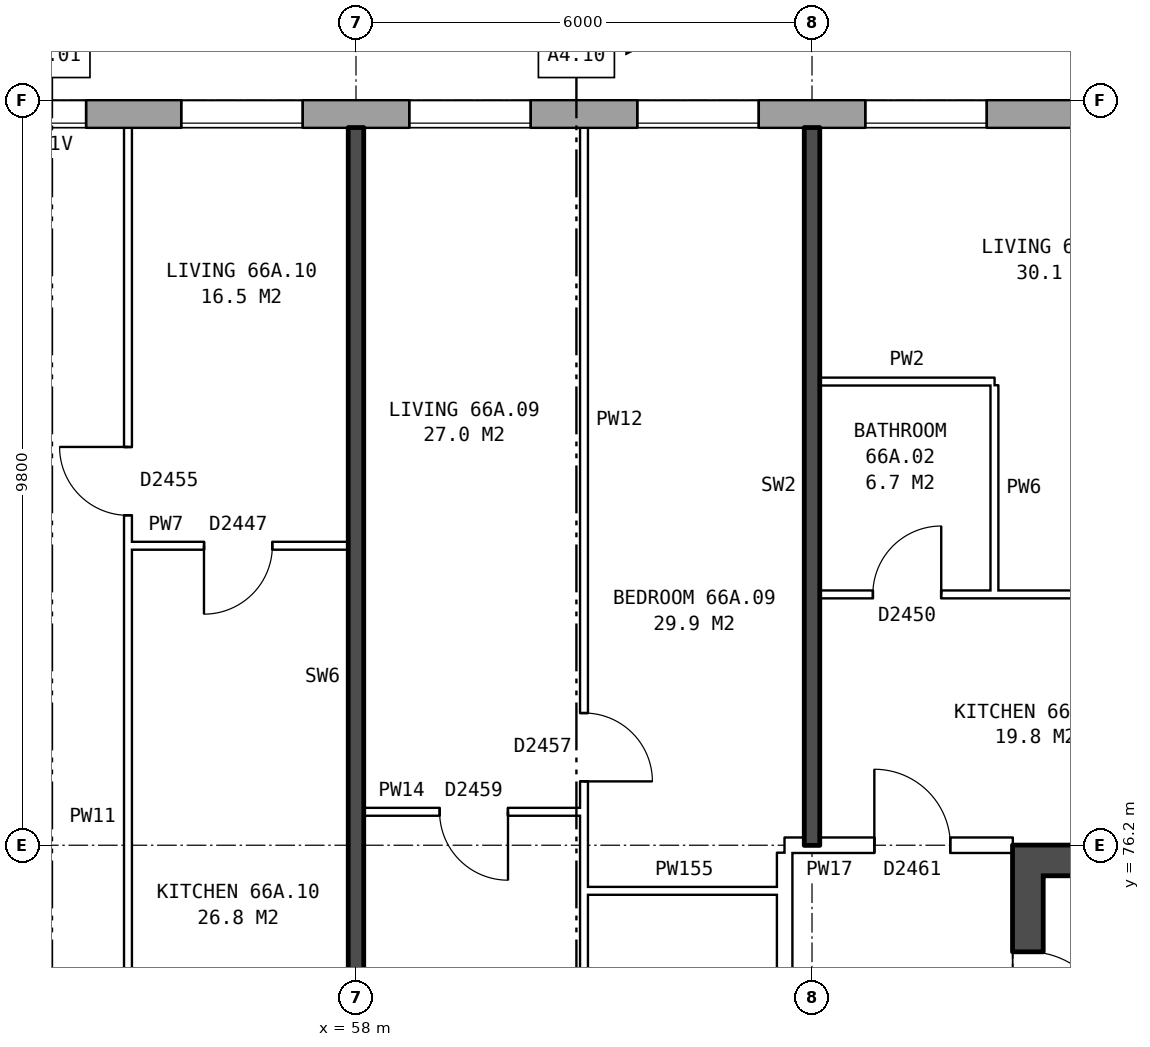
"""IFC4 building model, lengths in metres.
Left out: names, types, materials, properties, quantities, classifications, styles, units other than length and angle.
Written with IfcOpenShell. Run it as: python <this file> out.ifc"""

import sys

from ifc_helpers import new_model, si_unit, direction, frame, frame_2d, origin, place, context, subcontext, project, spatial, rectangle, extrude, element, fill, save


model = new_model("IFC4")
c1 = context("Model", 3, precision=1e-05, world=origin(), true_north=direction((0.0, 1.0)))
c2 = subcontext(c1, "Body", "Model", "MODEL_VIEW")
j1 = project(units=[si_unit("LENGTHUNIT", "METRE"), si_unit("PLANEANGLEUNIT", "RADIAN")], contexts=[c1])
p1 = place(None, origin())
s1 = spatial("IfcSite", under=j1, at=p1, CompositionType="ELEMENT")
p2 = place(p1, origin())
s2 = spatial("IfcBuilding", under=s1, at=p2, CompositionType="ELEMENT")
p3 = place(p2, frame((0.0, 0.0, 233.8)))
s3 = spatial("IfcBuildingStorey", under=s2, at=p3, CompositionType="ELEMENT", Elevation=233.8)
p4 = place(p3, frame((74.95, 85.82, 0.0), z_axis=(0.0, 0.0, 1.0), x_axis=(-1.0, 0.0, 0.0)))
e1 = element("IfcWall", 1, at=p4, inside=s3, PredefinedType="STANDARD", context=c2, shape_type="SweptSolid", body=[
    extrude(rectangle(XDim=39.875, YDim=0.36, at=frame_2d((19.938, 0.0))), origin(), (0.0, 0.0, 1.0), 2.85),
])
p5 = place(p4, frame((2.65, 0.0, 0.8)))
e2 = element("IfcOpeningElement", 2, at=p5, cuts=e1, PredefinedType="OPENING", context=c2, shape_type="SweptSolid", body=[
    extrude(rectangle(XDim=1.6, YDim=1.8, at=frame_2d((0.8, 0.9))), frame((0.0, 0.19, 0.0), z_axis=(0.0, -1.0, 0.0), x_axis=(1.0, 0.0, 0.0)), (0.0, 0.0, 1.0), 0.38),
])
p6 = place(p4, frame((5.65, 0.0, 0.8)))
e3 = element("IfcOpeningElement", 3, at=p6, cuts=e1, PredefinedType="OPENING", context=c2, shape_type="SweptSolid", body=[
    extrude(rectangle(XDim=1.6, YDim=1.8, at=frame_2d((0.8, 0.9))), frame((0.0, 0.19, 0.0), z_axis=(0.0, -1.0, 0.0), x_axis=(1.0, 0.0, 0.0)), (0.0, 0.0, 1.0), 0.38),
])
p7 = place(p4, frame((8.65, 0.0, 0.8)))
e4 = element("IfcOpeningElement", 4, at=p7, cuts=e1, PredefinedType="OPENING", context=c2, shape_type="SweptSolid", body=[
    extrude(rectangle(XDim=1.6, YDim=1.8, at=frame_2d((0.8, 0.9))), frame((0.0, 0.19, 0.0), z_axis=(0.0, -1.0, 0.0), x_axis=(1.0, 0.0, 0.0)), (0.0, 0.0, 1.0), 0.38),
])
p8 = place(p4, frame((11.65, 0.0, 0.8)))
e5 = element("IfcOpeningElement", 5, at=p8, cuts=e1, PredefinedType="OPENING", context=c2, shape_type="SweptSolid", body=[
    extrude(rectangle(XDim=1.6, YDim=1.8, at=frame_2d((0.8, 0.9))), frame((0.0, 0.19, 0.0), z_axis=(0.0, -1.0, 0.0), x_axis=(1.0, 0.0, 0.0)), (0.0, 0.0, 1.0), 0.38),
])
p9 = place(p4, frame((14.65, 0.0, 0.8)))
e6 = element("IfcOpeningElement", 6, at=p9, cuts=e1, PredefinedType="OPENING", context=c2, shape_type="SweptSolid", body=[
    extrude(rectangle(XDim=1.6, YDim=1.8, at=frame_2d((0.8, 0.9))), frame((0.0, 0.19, 0.0), z_axis=(0.0, -1.0, 0.0), x_axis=(1.0, 0.0, 0.0)), (0.0, 0.0, 1.0), 0.38),
])
p10 = place(p4, frame((17.65, 0.0, 0.8)))
e7 = element("IfcOpeningElement", 7, at=p10, cuts=e1, PredefinedType="OPENING", context=c2, shape_type="SweptSolid", body=[
    extrude(rectangle(XDim=1.6, YDim=1.8, at=frame_2d((0.8, 0.9))), frame((0.0, 0.19, 0.0), z_axis=(0.0, -1.0, 0.0), x_axis=(1.0, 0.0, 0.0)), (0.0, 0.0, 1.0), 0.38),
])
p11 = place(p4, frame((20.5, 0.0, 0.15)))
e8 = element("IfcOpeningElement", 8, at=p11, cuts=e1, PredefinedType="OPENING", context=c2, shape_type="SweptSolid", body=[
    extrude(rectangle(XDim=0.8, YDim=0.9, at=frame_2d((0.4, 0.45))), frame((0.0, 0.19, 0.0), z_axis=(0.0, -1.0, 0.0), x_axis=(1.0, 0.0, 0.0)), (0.0, 0.0, 1.0), 0.38),
])
p12 = place(p4, frame((23.65, 0.0, 0.8)))
e9 = element("IfcOpeningElement", 9, at=p12, cuts=e1, PredefinedType="OPENING", context=c2, shape_type="SweptSolid", body=[
    extrude(rectangle(XDim=1.6, YDim=1.8, at=frame_2d((0.8, 0.9))), frame((0.0, 0.19, 0.0), z_axis=(0.0, -1.0, 0.0), x_axis=(1.0, 0.0, 0.0)), (0.0, 0.0, 1.0), 0.38),
])
p13 = place(p4, frame((26.65, 0.0, 0.8)))
e10 = element("IfcOpeningElement", 10, at=p13, cuts=e1, PredefinedType="OPENING", context=c2, shape_type="SweptSolid", body=[
    extrude(rectangle(XDim=1.6, YDim=1.8, at=frame_2d((0.8, 0.9))), frame((0.0, 0.19, 0.0), z_axis=(0.0, -1.0, 0.0), x_axis=(1.0, 0.0, 0.0)), (0.0, 0.0, 1.0), 0.38),
])
p14 = place(p4, frame((29.65, 0.0, 0.8)))
e11 = element("IfcOpeningElement", 11, at=p14, cuts=e1, PredefinedType="OPENING", context=c2, shape_type="SweptSolid", body=[
    extrude(rectangle(XDim=1.6, YDim=1.8, at=frame_2d((0.8, 0.9))), frame((0.0, 0.19, 0.0), z_axis=(0.0, -1.0, 0.0), x_axis=(1.0, 0.0, 0.0)), (0.0, 0.0, 1.0), 0.38),
])
p15 = place(p4, frame((32.65, 0.0, 0.8)))
e12 = element("IfcOpeningElement", 12, at=p15, cuts=e1, PredefinedType="OPENING", context=c2, shape_type="SweptSolid", body=[
    extrude(rectangle(XDim=1.6, YDim=1.8, at=frame_2d((0.8, 0.9))), frame((0.0, 0.19, 0.0), z_axis=(0.0, -1.0, 0.0), x_axis=(1.0, 0.0, 0.0)), (0.0, 0.0, 1.0), 0.38),
])
p16 = place(p4, frame((35.65, 0.0, 0.8)))
e13 = element("IfcOpeningElement", 13, at=p16, cuts=e1, PredefinedType="OPENING", context=c2, shape_type="SweptSolid", body=[
    extrude(rectangle(XDim=1.6, YDim=1.8, at=frame_2d((0.8, 0.9))), frame((0.0, 0.19, 0.0), z_axis=(0.0, -1.0, 0.0), x_axis=(1.0, 0.0, 0.0)), (0.0, 0.0, 1.0), 0.38),
])
p17 = place(p3, frame((66.84, 63.8, 0.0), z_axis=(0.0, 0.0, 1.0), x_axis=(0.0, 1.0, 0.0)))
e14 = element("IfcWall", 14, at=p17, inside=s3, PredefinedType="SHEAR", context=c2, shape_type="SweptSolid", body=[
    extrude(rectangle(XDim=12.4, YDim=0.4, at=frame_2d((6.2, 0.0))), origin(), (0.0, 0.0, 1.0), 2.85),
])
p18 = place(p17, frame((1.325, 0.0, 0.0)))
e15 = element("IfcOpeningElement", 15, at=p18, cuts=e14, PredefinedType="OPENING", context=c2, shape_type="SweptSolid", body=[
    extrude(rectangle(XDim=1.1, YDim=2.1, at=frame_2d((0.55, 1.05))), frame((0.0, 0.21, 0.0), z_axis=(0.0, -1.0, 0.0), x_axis=(1.0, 0.0, 0.0)), (0.0, 0.0, 1.0), 0.42),
])
p19 = place(p17, frame((3.6, 0.0, 0.0)))
e16 = element("IfcOpeningElement", 16, at=p19, cuts=e14, PredefinedType="OPENING", context=c2, shape_type="SweptSolid", body=[
    extrude(rectangle(XDim=1.1, YDim=2.1, at=frame_2d((0.55, 1.05))), frame((0.0, 0.21, 0.0), z_axis=(0.0, -1.0, 0.0), x_axis=(1.0, 0.0, 0.0)), (0.0, 0.0, 1.0), 0.42),
])
p20 = place(p17, frame((5.8, 0.0, 0.0)))
e17 = element("IfcOpeningElement", 17, at=p20, cuts=e14, PredefinedType="OPENING", context=c2, shape_type="SweptSolid", body=[
    extrude(rectangle(XDim=1.1, YDim=2.1, at=frame_2d((0.55, 1.05))), frame((0.0, 0.21, 0.0), z_axis=(0.0, -1.0, 0.0), x_axis=(1.0, 0.0, 0.0)), (0.0, 0.0, 1.0), 0.42),
])
p21 = place(p17, frame((8.0, 0.0, 0.0)))
e18 = element("IfcOpeningElement", 18, at=p21, cuts=e14, PredefinedType="OPENING", context=c2, shape_type="SweptSolid", body=[
    extrude(rectangle(XDim=1.1, YDim=2.1, at=frame_2d((0.55, 1.05))), frame((0.0, 0.21, 0.0), z_axis=(0.0, -1.0, 0.0), x_axis=(1.0, 0.0, 0.0)), (0.0, 0.0, 1.0), 0.42),
])
p22 = place(p17, frame((9.9, 0.0, 0.0)))
e19 = element("IfcOpeningElement", 19, at=p22, cuts=e14, PredefinedType="OPENING", context=c2, shape_type="SweptSolid", body=[
    extrude(rectangle(XDim=1.1, YDim=2.1, at=frame_2d((0.55, 1.05))), frame((0.0, 0.21, 0.0), z_axis=(0.0, -1.0, 0.0), x_axis=(1.0, 0.0, 0.0)), (0.0, 0.0, 1.0), 0.42),
])
p23 = place(p3, frame((67.04, 76.0, 0.0), z_axis=(0.0, 0.0, 1.0), x_axis=(1.0, 0.0, 0.0)))
e20 = element("IfcWall", 20, at=p23, inside=s3, PredefinedType="SHEAR", context=c2, shape_type="SweptSolid", body=[
    extrude(rectangle(XDim=8.2, YDim=0.4, at=frame_2d((4.1, 0.0))), origin(), (0.0, 0.0, 1.0), 2.85),
])
p24 = place(p3, frame((63.64, 63.9, 0.0), z_axis=(0.0, 0.0, 1.0), x_axis=(0.0, 1.0, 0.0)))
e21 = element("IfcWall", 21, at=p24, inside=s3, PredefinedType="PARTITIONING", context=c2, shape_type="SweptSolid", body=[
    extrude(rectangle(XDim=12.2, YDim=0.2, at=frame_2d((6.1, 0.0))), origin(), (0.0, 0.0, 1.0), 2.85),
])
p25 = place(p24, frame((5.1, 0.0, 0.0)))
e22 = element("IfcOpeningElement", 22, at=p25, cuts=e21, PredefinedType="OPENING", context=c2, shape_type="SweptSolid", body=[
    extrude(rectangle(XDim=2.0, YDim=2.1, at=frame_2d((1.0, 1.05))), frame((0.0, 0.11, 0.0), z_axis=(0.0, -1.0, 0.0), x_axis=(1.0, 0.0, 0.0)), (0.0, 0.0, 1.0), 0.22),
])
p26 = place(p3, frame((61.0, 75.6, 0.0), z_axis=(0.0, 0.0, 1.0), x_axis=(1.0, 0.0, 0.0)))
e23 = element("IfcWall", 23, at=p26, inside=s3, PredefinedType="PARTITIONING", context=c2, shape_type="SweptSolid", body=[
    extrude(rectangle(XDim=2.64, YDim=0.1, at=frame_2d((1.32, 0.0))), origin(), (0.0, 0.0, 1.0), 2.85),
])
p27 = place(p3, frame((63.64, 76.2, 0.0), z_axis=(0.0, 0.0, 1.0), x_axis=(1.0, 0.0, 0.0)))
e24 = element("IfcWall", 24, at=p27, inside=s3, PredefinedType="PARTITIONING", context=c2, shape_type="SweptSolid", body=[
    extrude(rectangle(XDim=3.0, YDim=0.2, at=frame_2d((1.5, 0.0))), origin(), (0.0, 0.0, 1.0), 2.85),
])
p28 = place(p27, frame((1.18, 0.0, 0.0)))
e25 = element("IfcOpeningElement", 25, at=p28, cuts=e24, PredefinedType="OPENING", context=c2, shape_type="SweptSolid", body=[
    extrude(rectangle(XDim=1.0, YDim=2.1, at=frame_2d((0.5, 1.05))), frame((0.0, 0.11, 0.0), z_axis=(0.0, -1.0, 0.0), x_axis=(1.0, 0.0, 0.0)), (0.0, 0.0, 1.0), 0.22),
])
p29 = place(p3, frame((58.1, 76.64, 0.0), z_axis=(0.0, 0.0, 1.0), x_axis=(1.0, 0.0, 0.0)))
e26 = element("IfcWall", 26, at=p29, inside=s3, PredefinedType="PARTITIONING", context=c2, shape_type="SweptSolid", body=[
    extrude(rectangle(XDim=2.9, YDim=0.1, at=frame_2d((1.45, 0.0))), origin(), (0.0, 0.0, 1.0), 2.85),
])
p30 = place(p29, frame((1.0, 0.0, 0.0)))
e27 = element("IfcOpeningElement", 27, at=p30, cuts=e26, PredefinedType="OPENING", context=c2, shape_type="SweptSolid", body=[
    extrude(rectangle(XDim=0.9, YDim=2.1, at=frame_2d((0.45, 1.05))), frame((0.0, 0.06, 0.0), z_axis=(0.0, -1.0, 0.0), x_axis=(1.0, 0.0, 0.0)), (0.0, 0.0, 1.0), 0.12),
])
p31 = place(p3, frame((64.1, 79.5, 0.0), z_axis=(0.0, 0.0, 1.0), x_axis=(1.0, 0.0, 0.0)))
e28 = element("IfcWall", 28, at=p31, inside=s3, PredefinedType="PARTITIONING", context=c2, shape_type="SweptSolid", body=[
    extrude(rectangle(XDim=11.8, YDim=0.1, at=frame_2d((5.9, 0.0))), origin(), (0.0, 0.0, 1.0), 2.85),
])
p32 = place(p31, frame((3.65, 0.0, 0.0)))
e29 = element("IfcOpeningElement", 29, at=p32, cuts=e28, PredefinedType="OPENING", context=c2, shape_type="SweptSolid", body=[
    extrude(rectangle(XDim=0.9, YDim=2.1, at=frame_2d((0.45, 1.05))), frame((0.0, 0.06, 0.0), z_axis=(0.0, -1.0, 0.0), x_axis=(1.0, 0.0, 0.0)), (0.0, 0.0, 1.0), 0.12),
])
p33 = place(p31, frame((0.7, 0.0, 0.0)))
e30 = element("IfcOpeningElement", 30, at=p33, cuts=e28, PredefinedType="OPENING", context=c2, shape_type="SweptSolid", body=[
    extrude(rectangle(XDim=0.9, YDim=2.1, at=frame_2d((0.45, 1.05))), frame((0.0, 0.06, 0.0), z_axis=(0.0, -1.0, 0.0), x_axis=(1.0, 0.0, 0.0)), (0.0, 0.0, 1.0), 0.12),
])
p34 = place(p3, frame((55.0, 80.14, 0.0), z_axis=(0.0, 0.0, 1.0), x_axis=(1.0, 0.0, 0.0)))
e31 = element("IfcWall", 31, at=p34, inside=s3, PredefinedType="PARTITIONING", context=c2, shape_type="SweptSolid", body=[
    extrude(rectangle(XDim=2.9, YDim=0.1, at=frame_2d((1.45, 0.0))), origin(), (0.0, 0.0, 1.0), 2.85),
])
p35 = place(p34, frame((1.0, 0.0, 0.0)))
e32 = element("IfcOpeningElement", 32, at=p35, cuts=e31, PredefinedType="OPENING", context=c2, shape_type="SweptSolid", body=[
    extrude(rectangle(XDim=0.9, YDim=2.1, at=frame_2d((0.45, 1.05))), frame((0.0, 0.06, 0.0), z_axis=(0.0, -1.0, 0.0), x_axis=(1.0, 0.0, 0.0)), (0.0, 0.0, 1.0), 0.12),
])
p36 = place(p3, frame((64.1, 82.3, 0.0), z_axis=(0.0, 0.0, 1.0), x_axis=(1.0, 0.0, 0.0)))
e33 = element("IfcWall", 33, at=p36, inside=s3, PredefinedType="PARTITIONING", context=c2, shape_type="SweptSolid", body=[
    extrude(rectangle(XDim=2.3, YDim=0.1, at=frame_2d((1.15, 0.0))), origin(), (0.0, 0.0, 1.0), 2.85),
])
p37 = place(p3, frame((55.0, 71.3, 0.0), z_axis=(0.0, 0.0, 1.0), x_axis=(0.0, 1.0, 0.0)))
e34 = element("IfcWall", 34, at=p37, inside=s3, PredefinedType="PARTITIONING", context=c2, shape_type="SweptSolid", body=[
    extrude(rectangle(XDim=14.34, YDim=0.1, at=frame_2d((7.17, 0.0))), origin(), (0.0, 0.0, 1.0), 2.85),
])
p38 = place(p37, frame((9.24, 0.0, 0.0)))
e35 = element("IfcOpeningElement", 35, at=p38, cuts=e34, PredefinedType="OPENING", context=c2, shape_type="SweptSolid", body=[
    extrude(rectangle(XDim=0.9, YDim=2.1, at=frame_2d((0.45, 1.05))), frame((0.0, 0.06, 0.0), z_axis=(0.0, -1.0, 0.0), x_axis=(1.0, 0.0, 0.0)), (0.0, 0.0, 1.0), 0.12),
])
p39 = place(p37, frame((0.4, 0.0, 0.0)))
e36 = element("IfcOpeningElement", 36, at=p39, cuts=e34, PredefinedType="OPENING", context=c2, shape_type="SweptSolid", body=[
    extrude(rectangle(XDim=0.9, YDim=2.1, at=frame_2d((0.45, 1.05))), frame((0.0, 0.06, 0.0), z_axis=(0.0, -1.0, 0.0), x_axis=(1.0, 0.0, 0.0)), (0.0, 0.0, 1.0), 0.12),
])
p40 = place(p3, frame((58.0, 71.2, 0.0), z_axis=(0.0, 0.0, 1.0), x_axis=(0.0, 1.0, 0.0)))
e37 = element("IfcWall", 37, at=p40, inside=s3, PredefinedType="SOLIDWALL", context=c2, shape_type="SweptSolid", body=[
    extrude(rectangle(XDim=14.44, YDim=0.2, at=frame_2d((7.22, 0.0))), origin(), (0.0, 0.0, 1.0), 2.85),
])
p41 = place(p3, frame((61.0, 71.3, 0.0), z_axis=(0.0, 0.0, 1.0), x_axis=(0.0, 1.0, 0.0)))
e38 = element("IfcWall", 38, at=p41, inside=s3, PredefinedType="PARTITIONING", context=c2, shape_type="SweptSolid", body=[
    extrude(rectangle(XDim=14.34, YDim=0.1, at=frame_2d((7.17, 0.0))), origin(), (0.0, 0.0, 1.0), 2.85),
])
p42 = place(p41, frame((5.74, 0.0, 0.0)))
e39 = element("IfcOpeningElement", 39, at=p42, cuts=e38, PredefinedType="OPENING", context=c2, shape_type="SweptSolid", body=[
    extrude(rectangle(XDim=0.9, YDim=2.1, at=frame_2d((0.45, 1.05))), frame((0.0, 0.06, 0.0), z_axis=(0.0, -1.0, 0.0), x_axis=(1.0, 0.0, 0.0)), (0.0, 0.0, 1.0), 0.12),
])
p43 = place(p41, frame((0.4, 0.0, 0.0)))
e40 = element("IfcOpeningElement", 40, at=p43, cuts=e38, PredefinedType="OPENING", context=c2, shape_type="SweptSolid", body=[
    extrude(rectangle(XDim=0.9, YDim=2.1, at=frame_2d((0.45, 1.05))), frame((0.0, 0.06, 0.0), z_axis=(0.0, -1.0, 0.0), x_axis=(1.0, 0.0, 0.0)), (0.0, 0.0, 1.0), 0.12),
])
p44 = place(p3, frame((64.0, 76.2, 0.0), z_axis=(0.0, 0.0, 1.0), x_axis=(0.0, 1.0, 0.0)))
e41 = element("IfcWall", 41, at=p44, inside=s3, PredefinedType="SOLIDWALL", context=c2, shape_type="SweptSolid", body=[
    extrude(rectangle(XDim=9.44, YDim=0.2, at=frame_2d((4.72, 0.0))), origin(), (0.0, 0.0, 1.0), 2.85),
])
p45 = place(p3, frame((66.4, 79.55, 0.0), z_axis=(0.0, 0.0, 1.0), x_axis=(0.0, 1.0, 0.0)))
e42 = element("IfcWall", 42, at=p45, inside=s3, PredefinedType="PARTITIONING", context=c2, shape_type="SweptSolid", body=[
    extrude(rectangle(XDim=2.7, YDim=0.1, at=frame_2d((1.35, 0.0))), origin(), (0.0, 0.0, 1.0), 2.85),
])
p46 = place(p7, origin())
e43 = element("IfcWindow", 43, at=p46, inside=s3, PartitioningType="SINGLE_PANEL", PredefinedType="WINDOW", context=c2, shape_type="SweptSolid", body=[
    extrude(rectangle(XDim=1.6, YDim=1.8, at=frame_2d((0.8, 0.9))), frame((0.0, 0.15, 0.0), z_axis=(0.0, -1.0, 0.0), x_axis=(1.0, 0.0, 0.0)), (0.0, 0.0, 1.0), 0.06),
])
fill(e4, e43)
p47 = place(p8, origin())
e44 = element("IfcWindow", 44, at=p47, inside=s3, PartitioningType="SINGLE_PANEL", PredefinedType="WINDOW", context=c2, shape_type="SweptSolid", body=[
    extrude(rectangle(XDim=1.6, YDim=1.8, at=frame_2d((0.8, 0.9))), frame((0.0, 0.15, 0.0), z_axis=(0.0, -1.0, 0.0), x_axis=(1.0, 0.0, 0.0)), (0.0, 0.0, 1.0), 0.06),
])
fill(e5, e44)
p48 = place(p9, origin())
e45 = element("IfcWindow", 45, at=p48, inside=s3, PartitioningType="SINGLE_PANEL", PredefinedType="WINDOW", context=c2, shape_type="SweptSolid", body=[
    extrude(rectangle(XDim=1.6, YDim=1.8, at=frame_2d((0.8, 0.9))), frame((0.0, 0.15, 0.0), z_axis=(0.0, -1.0, 0.0), x_axis=(1.0, 0.0, 0.0)), (0.0, 0.0, 1.0), 0.06),
])
fill(e6, e45)
p49 = place(p10, origin())
e46 = element("IfcWindow", 46, at=p49, inside=s3, PartitioningType="SINGLE_PANEL", PredefinedType="WINDOW", context=c2, shape_type="SweptSolid", body=[
    extrude(rectangle(XDim=1.6, YDim=1.8, at=frame_2d((0.8, 0.9))), frame((0.0, 0.15, 0.0), z_axis=(0.0, -1.0, 0.0), x_axis=(1.0, 0.0, 0.0)), (0.0, 0.0, 1.0), 0.06),
])
fill(e7, e46)
p50 = place(p11, origin())
e47 = element("IfcWindow", 47, at=p50, inside=s3, PartitioningType="SINGLE_PANEL", PredefinedType="WINDOW", context=c2, shape_type="SweptSolid", body=[
    extrude(rectangle(XDim=0.8, YDim=0.9, at=frame_2d((0.4, 0.45))), frame((0.0, 0.15, 0.0), z_axis=(0.0, -1.0, 0.0), x_axis=(1.0, 0.0, 0.0)), (0.0, 0.0, 1.0), 0.06),
])
fill(e8, e47)
p51 = place(p22, frame((1.1, 0.0, 0.0), z_axis=(0.0, 0.0, 1.0), x_axis=(-1.0, 0.0, 0.0)))
e48 = element("IfcDoor", 48, at=p51, inside=s3, OperationType="SINGLE_SWING_RIGHT", PredefinedType="DOOR", context=c2, shape_type="SweptSolid", body=[
    extrude(rectangle(XDim=1.1, YDim=2.1, at=frame_2d((0.55, 1.05))), frame((0.0, 0.185, 0.0), z_axis=(0.0, -1.0, 0.0), x_axis=(1.0, 0.0, 0.0)), (0.0, 0.0, 1.0), 0.05),
])
fill(e19, e48)
p52 = place(p28, origin())
e49 = element("IfcDoor", 49, at=p52, inside=s3, OperationType="SINGLE_SWING_LEFT", PredefinedType="DOOR", context=c2, shape_type="SweptSolid", body=[
    extrude(rectangle(XDim=1.0, YDim=2.1, at=frame_2d((0.5, 1.05))), frame((0.0, 0.025, 0.0), z_axis=(0.0, -1.0, 0.0), x_axis=(1.0, 0.0, 0.0)), (0.0, 0.0, 1.0), 0.05),
])
fill(e25, e49)
p53 = place(p33, origin())
e50 = element("IfcDoor", 50, at=p53, inside=s3, OperationType="SINGLE_SWING_RIGHT", PredefinedType="DOOR", context=c2, shape_type="SweptSolid", body=[
    extrude(rectangle(XDim=0.9, YDim=2.1, at=frame_2d((0.45, 1.05))), frame((0.0, 0.025, 0.0), z_axis=(0.0, -1.0, 0.0), x_axis=(1.0, 0.0, 0.0)), (0.0, 0.0, 1.0), 0.05),
])
fill(e30, e50)
p54 = place(p42, frame((0.9, 0.0, 0.0), z_axis=(0.0, 0.0, 1.0), x_axis=(-1.0, 0.0, 0.0)))
e51 = element("IfcDoor", 51, at=p54, inside=s3, OperationType="SINGLE_SWING_RIGHT", PredefinedType="DOOR", context=c2, shape_type="SweptSolid", body=[
    extrude(rectangle(XDim=0.9, YDim=2.1, at=frame_2d((0.45, 1.05))), frame((0.0, 0.025, 0.0), z_axis=(0.0, -1.0, 0.0), x_axis=(1.0, 0.0, 0.0)), (0.0, 0.0, 1.0), 0.05),
])
fill(e39, e51)
p55 = place(p30, frame((0.9, 0.0, 0.0), z_axis=(0.0, 0.0, 1.0), x_axis=(-1.0, 0.0, 0.0)))
e52 = element("IfcDoor", 52, at=p55, inside=s3, OperationType="SINGLE_SWING_LEFT", PredefinedType="DOOR", context=c2, shape_type="SweptSolid", body=[
    extrude(rectangle(XDim=0.9, YDim=2.1, at=frame_2d((0.45, 1.05))), frame((0.0, 0.025, 0.0), z_axis=(0.0, -1.0, 0.0), x_axis=(1.0, 0.0, 0.0)), (0.0, 0.0, 1.0), 0.05),
])
fill(e27, e52)
p56 = place(p38, origin())
e53 = element("IfcDoor", 53, at=p56, inside=s3, OperationType="SINGLE_SWING_RIGHT", PredefinedType="DOOR", context=c2, shape_type="SweptSolid", body=[
    extrude(rectangle(XDim=0.9, YDim=2.1, at=frame_2d((0.45, 1.05))), frame((0.0, 0.025, 0.0), z_axis=(0.0, -1.0, 0.0), x_axis=(1.0, 0.0, 0.0)), (0.0, 0.0, 1.0), 0.05),
])
fill(e35, e53)
p57 = place(p35, frame((0.9, 0.0, 0.0), z_axis=(0.0, 0.0, 1.0), x_axis=(-1.0, 0.0, 0.0)))
e54 = element("IfcDoor", 54, at=p57, inside=s3, OperationType="SINGLE_SWING_RIGHT", PredefinedType="DOOR", context=c2, shape_type="SweptSolid", body=[
    extrude(rectangle(XDim=0.9, YDim=2.1, at=frame_2d((0.45, 1.05))), frame((0.0, 0.025, 0.0), z_axis=(0.0, -1.0, 0.0), x_axis=(1.0, 0.0, 0.0)), (0.0, 0.0, 1.0), 0.05),
])
fill(e32, e54)
save(model, sys.argv[1])
